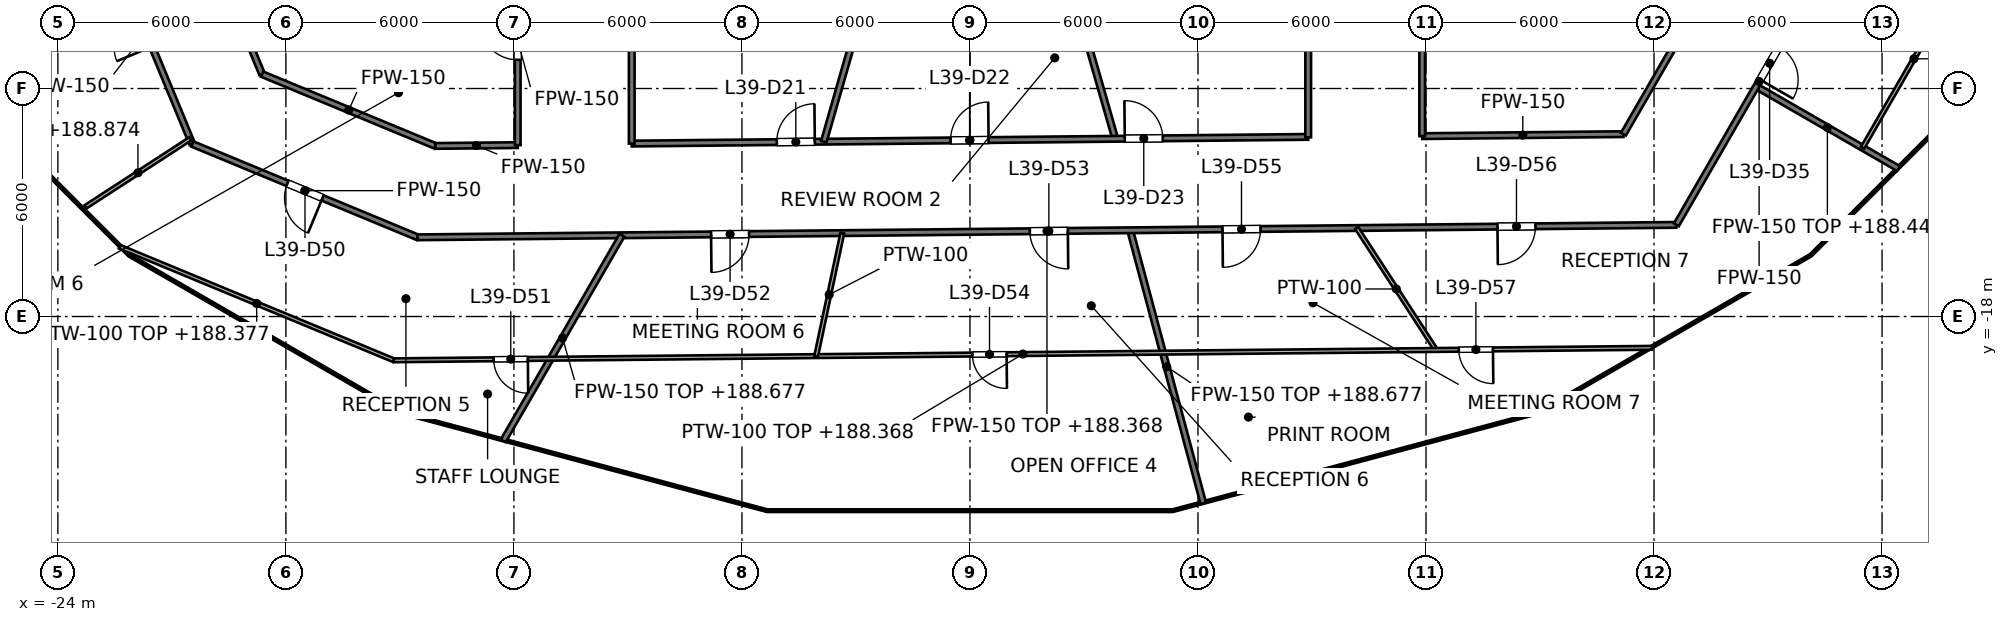
"""IFC4 building model, lengths in metres.
Left out: names, types, materials, properties, quantities, classifications, styles, units other than length and angle.
Written with IfcOpenShell. Run it as: python <this file> out.ifc"""

import sys

from ifc_helpers import new_model, si_unit, direction, frame, frame_2d, origin, place, context, subcontext, project, spatial, rectangle, extrude, element, fill, save


model = new_model("IFC4")
c1 = context("Model", 3, precision=1e-05, world=origin(), true_north=direction((0.0, 1.0)))
c2 = subcontext(c1, "Body", "Model", "MODEL_VIEW")
j1 = project(units=[si_unit("LENGTHUNIT", "METRE"), si_unit("PLANEANGLEUNIT", "RADIAN")], contexts=[c1])
p1 = place(None, origin())
s1 = spatial("IfcSite", under=j1, at=p1, CompositionType="ELEMENT")
p2 = place(p1, origin())
s2 = spatial("IfcBuilding", under=s1, at=p2, CompositionType="ELEMENT")
p3 = place(p2, frame((0.0, 0.0, 185.6)))
s3 = spatial("IfcBuildingStorey", under=s2, at=p3, CompositionType="ELEMENT", Elevation=185.6)
p4 = place(p3, frame((4.215, -15.73, 0.0), z_axis=(0.0, 0.0, 1.0), x_axis=(0.258765615768, -0.965940141052, 0.0)))
e1 = element("IfcWall", 1, at=p4, inside=s3, PredefinedType="PARTITIONING", context=c2, shape_type="SweptSolid", body=[
    extrude(rectangle(XDim=7.438, YDim=0.15, at=frame_2d((3.719, 0.0))), origin(), (0.0, 0.0, 1.0), 3.077),
])
p5 = place(p3, frame((2.296, -8.0, 0.0), z_axis=(0.0, 0.0, 1.0), x_axis=(0.275935525478, -0.961176147113, 0.0)))
e2 = element("IfcWall", 2, at=p5, inside=s3, PredefinedType="PARTITIONING", context=c2, shape_type="SweptSolid", body=[
    extrude(rectangle(XDim=5.548, YDim=0.15, at=frame_2d((2.774, 0.0))), origin(), (0.0, 0.0, 1.0), 3.7),
])
p6 = place(p3, frame((-22.9, -7.572, 0.0), z_axis=(0.0, 0.0, 1.0), x_axis=(0.382367581622, -0.924010298928, 0.0)))
e3 = element("IfcWall", 3, at=p6, inside=s3, PredefinedType="PARTITIONING", context=c2, shape_type="SweptSolid", body=[
    extrude(rectangle(XDim=6.374, YDim=0.15, at=frame_2d((3.187, 0.0))), origin(), (0.0, 0.0, 1.0), 2.777),
])
p7 = place(p6, frame((2.6, 0.0, 0.0)))
e4 = element("IfcOpeningElement", 4, at=p7, cuts=e3, PredefinedType="OPENING", context=c2, shape_type="SweptSolid", body=[
    extrude(rectangle(XDim=1.0, YDim=2.1, at=frame_2d((0.5, 1.05))), frame((0.0, 0.075, 0.0), z_axis=(0.0, -1.0, 0.0), x_axis=(1.0, 0.0, 0.0)), (0.0, 0.0, 1.0), 0.15),
])
p8 = place(p3, frame((-20.5, -7.095, 0.0), z_axis=(0.0, 0.0, 1.0), x_axis=(0.382364990163, -0.924011371303, 0.0)))
e5 = element("IfcWall", 5, at=p8, inside=s3, PredefinedType="PARTITIONING", context=c2, shape_type="SweptSolid", body=[
    extrude(rectangle(XDim=4.902, YDim=0.15, at=frame_2d((2.451, 0.0))), origin(), (0.0, 0.0, 1.0), 2.845),
])
p9 = place(p3, frame((20.69, -11.945, 0.0), z_axis=(0.0, 0.0, 1.0), x_axis=(0.866048255864, -0.499960416948, 0.0)))
e6 = element("IfcWall", 6, at=p9, inside=s3, PredefinedType="PARTITIONING", context=c2, shape_type="SweptSolid", body=[
    extrude(rectangle(XDim=4.322, YDim=0.15, at=frame_2d((2.161, 0.0))), origin(), (0.0, 0.0, 1.0), 2.845),
])
p10 = place(p3, frame((-20.46, -13.46, 0.0), z_axis=(0.0, 0.0, 1.0), x_axis=(0.923801547606, -0.382871650349, 0.0)))
e7 = element("IfcWall", 7, at=p10, inside=s3, PredefinedType="PARTITIONING", context=c2, shape_type="SweptSolid", body=[
    extrude(rectangle(XDim=6.415, YDim=0.15, at=frame_2d((3.208, 0.0))), origin(), (0.0, 0.0, 1.0), 2.777),
])
p11 = place(p10, frame((2.707, 0.0, 0.0)))
e8 = element("IfcOpeningElement", 8, at=p11, cuts=e7, PredefinedType="OPENING", context=c2, shape_type="SweptSolid", body=[
    extrude(rectangle(XDim=1.0, YDim=2.1, at=frame_2d((0.5, 1.05))), frame((0.0, 0.075, 0.0), z_axis=(0.0, -1.0, 0.0), x_axis=(1.0, 0.0, 0.0)), (0.0, 0.0, 1.0), 0.15),
])
p12 = place(p3, frame((-18.623, -11.623, 0.0), z_axis=(0.0, 0.0, 1.0), x_axis=(0.923791670587, -0.38289548098, 0.0)))
e9 = element("IfcWall", 9, at=p12, inside=s3, PredefinedType="PARTITIONING", context=c2, shape_type="SweptSolid", body=[
    extrude(rectangle(XDim=4.931, YDim=0.15, at=frame_2d((2.465, 0.0))), origin(), (0.0, 0.0, 1.0), 2.777),
])
p13 = place(p3, frame((-14.534, -15.916, 0.0), z_axis=(0.0, 0.0, 1.0), x_axis=(0.999951221888, 0.009876935033, 0.0)))
e10 = element("IfcWall", 10, at=p13, inside=s3, PredefinedType="PARTITIONING", context=c2, shape_type="SweptSolid", body=[
    extrude(rectangle(XDim=33.123, YDim=0.15, at=frame_2d((16.561, 0.0))), origin(), (0.0, 0.0, 1.0), 2.768),
])
p14 = place(p13, frame((7.722, 0.0, 0.0)))
e11 = element("IfcOpeningElement", 11, at=p14, cuts=e10, PredefinedType="OPENING", context=c2, shape_type="SweptSolid", body=[
    extrude(rectangle(XDim=1.0, YDim=2.1, at=frame_2d((0.5, 1.05))), frame((0.0, 0.075, 0.0), z_axis=(0.0, -1.0, 0.0), x_axis=(1.0, 0.0, 0.0)), (0.0, 0.0, 1.0), 0.15),
])
p15 = place(p13, frame((16.111, 0.0, 0.0)))
e12 = element("IfcOpeningElement", 12, at=p15, cuts=e10, PredefinedType="OPENING", context=c2, shape_type="SweptSolid", body=[
    extrude(rectangle(XDim=1.0, YDim=2.1, at=frame_2d((0.5, 1.05))), frame((0.0, 0.075, 0.0), z_axis=(0.0, -1.0, 0.0), x_axis=(1.0, 0.0, 0.0)), (0.0, 0.0, 1.0), 0.15),
])
p16 = place(p13, frame((21.18, 0.0, 0.0)))
e13 = element("IfcOpeningElement", 13, at=p16, cuts=e10, PredefinedType="OPENING", context=c2, shape_type="SweptSolid", body=[
    extrude(rectangle(XDim=1.0, YDim=2.1, at=frame_2d((0.5, 1.05))), frame((0.0, 0.075, 0.0), z_axis=(0.0, -1.0, 0.0), x_axis=(1.0, 0.0, 0.0)), (0.0, 0.0, 1.0), 0.15),
])
p17 = place(p13, frame((28.416, 0.0, 0.0)))
e14 = element("IfcOpeningElement", 14, at=p17, cuts=e10, PredefinedType="OPENING", context=c2, shape_type="SweptSolid", body=[
    extrude(rectangle(XDim=1.0, YDim=2.1, at=frame_2d((0.5, 1.05))), frame((0.0, 0.075, 0.0), z_axis=(0.0, -1.0, 0.0), x_axis=(1.0, 0.0, 0.0)), (0.0, 0.0, 1.0), 0.15),
])
p18 = place(p3, frame((-14.068, -13.511, 0.0), z_axis=(0.0, 0.0, 1.0), x_axis=(0.999950911515, 0.009908307647, 0.0)))
e15 = element("IfcWall", 15, at=p18, inside=s3, PredefinedType="PARTITIONING", context=c2, shape_type="SweptSolid", body=[
    extrude(rectangle(XDim=2.168, YDim=0.15, at=frame_2d((1.084, 0.0))), origin(), (0.0, 0.0, 1.0), 2.777),
])
p19 = place(p3, frame((-8.9, -13.449, 0.0), z_axis=(0.0, 0.0, 1.0), x_axis=(0.999951241216, 0.009874977968, 0.0)))
e16 = element("IfcWall", 16, at=p19, inside=s3, PredefinedType="PARTITIONING", context=c2, shape_type="SweptSolid", body=[
    extrude(rectangle(XDim=17.801, YDim=0.15, at=frame_2d((8.9, 0.0))), origin(), (0.0, 0.0, 1.0), 2.768),
])
p20 = place(p19, frame((3.817, 0.0, 0.0)))
e17 = element("IfcOpeningElement", 17, at=p20, cuts=e16, PredefinedType="OPENING", context=c2, shape_type="SweptSolid", body=[
    extrude(rectangle(XDim=1.0, YDim=2.1, at=frame_2d((0.5, 1.05))), frame((0.0, 0.075, 0.0), z_axis=(0.0, -1.0, 0.0), x_axis=(1.0, 0.0, 0.0)), (0.0, 0.0, 1.0), 0.15),
])
p21 = place(p19, frame((8.39, 0.0, 0.0)))
e18 = element("IfcOpeningElement", 18, at=p21, cuts=e16, PredefinedType="OPENING", context=c2, shape_type="SweptSolid", body=[
    extrude(rectangle(XDim=1.0, YDim=2.1, at=frame_2d((0.5, 1.05))), frame((0.0, 0.075, 0.0), z_axis=(0.0, -1.0, 0.0), x_axis=(1.0, 0.0, 0.0)), (0.0, 0.0, 1.0), 0.15),
])
p22 = place(p19, frame((12.974, 0.0, 0.0)))
e19 = element("IfcOpeningElement", 19, at=p22, cuts=e16, PredefinedType="OPENING", context=c2, shape_type="SweptSolid", body=[
    extrude(rectangle(XDim=1.0, YDim=2.1, at=frame_2d((0.5, 1.05))), frame((0.0, 0.075, 0.0), z_axis=(0.0, -1.0, 0.0), x_axis=(1.0, 0.0, 0.0)), (0.0, 0.0, 1.0), 0.15),
])
p23 = place(p3, frame((11.9, -13.253, 0.0), z_axis=(0.0, 0.0, 1.0), x_axis=(0.999951309192, 0.009868092237, 0.0)))
e20 = element("IfcWall", 20, at=p23, inside=s3, PredefinedType="PARTITIONING", context=c2, shape_type="SweptSolid", body=[
    extrude(rectangle(XDim=5.294, YDim=0.15, at=frame_2d((2.647, 0.0))), origin(), (0.0, 0.0, 1.0), 2.777),
])
p24 = place(p3, frame((18.587, -15.587, 0.0), z_axis=(0.0, 0.0, 1.0), x_axis=(0.499960140076, 0.866048415699, 0.0)))
e21 = element("IfcWall", 21, at=p24, inside=s3, PredefinedType="PARTITIONING", context=c2, shape_type="SweptSolid", body=[
    extrude(rectangle(XDim=8.714, YDim=0.15, at=frame_2d((4.357, 0.0))), origin(), (0.0, 0.0, 1.0), 2.777),
])
p25 = place(p24, frame((4.41, 0.0, 0.0)))
e22 = element("IfcOpeningElement", 22, at=p25, cuts=e21, PredefinedType="OPENING", context=c2, shape_type="SweptSolid", body=[
    extrude(rectangle(XDim=1.0, YDim=2.1, at=frame_2d((0.5, 1.05))), frame((0.0, 0.075, 0.0), z_axis=(0.0, -1.0, 0.0), x_axis=(1.0, 0.0, 0.0)), (0.0, 0.0, 1.0), 0.15),
])
p26 = place(p3, frame((17.194, -13.201, 0.0), z_axis=(0.0, 0.0, 1.0), x_axis=(0.499955744085, 0.866050953441, 0.0)))
e23 = element("IfcWall", 23, at=p26, inside=s3, PredefinedType="PARTITIONING", context=c2, shape_type="SweptSolid", body=[
    extrude(rectangle(XDim=6.673, YDim=0.15, at=frame_2d((3.337, 0.0))), origin(), (0.0, 0.0, 1.0), 2.777),
])
p27 = place(p26, frame((2.835, 0.0, 0.0)))
e24 = element("IfcOpeningElement", 24, at=p27, cuts=e23, PredefinedType="OPENING", context=c2, shape_type="SweptSolid", body=[
    extrude(rectangle(XDim=1.0, YDim=2.1, at=frame_2d((0.5, 1.05))), frame((0.0, 0.075, 0.0), z_axis=(0.0, -1.0, 0.0), x_axis=(1.0, 0.0, 0.0)), (0.0, 0.0, 1.0), 0.15),
])
p28 = place(p3, frame((-12.28, -21.27, 0.0), z_axis=(0.0, 0.0, 1.0), x_axis=(0.499966163276, 0.866044938545, 0.0)))
e25 = element("IfcWall", 25, at=p28, inside=s3, PredefinedType="PARTITIONING", context=c2, shape_type="SweptSolid", body=[
    extrude(rectangle(XDim=6.244, YDim=0.15, at=frame_2d((3.122, 0.0))), origin(), (0.0, 0.0, 1.0), 3.077),
])
p29 = place(p3, frame((-3.846, -13.399, 0.0), z_axis=(0.0, 0.0, 1.0), x_axis=(0.275914969745, 0.961182048038, 0.0)))
e26 = element("IfcWall", 26, at=p29, inside=s3, PredefinedType="PARTITIONING", context=c2, shape_type="SweptSolid", body=[
    extrude(rectangle(XDim=5.617, YDim=0.15, at=frame_2d((2.809, 0.0))), origin(), (0.0, 0.0, 1.0), 3.7),
])
p30 = place(p3, frame((11.9, -13.253, 0.0), z_axis=(0.0, 0.0, 1.0), x_axis=(0.0, 1.0, 0.0)))
e27 = element("IfcWall", 27, at=p30, inside=s3, PredefinedType="PARTITIONING", context=c2, shape_type="SweptSolid", body=[
    extrude(rectangle(XDim=5.253, YDim=0.15, at=frame_2d((2.626, 0.0))), origin(), (0.0, 0.0, 1.0), 2.777),
])
p31 = place(p3, frame((8.9, -13.283, 0.0), z_axis=(0.0, 0.0, 1.0), x_axis=(0.0, 1.0, 0.0)))
e28 = element("IfcWall", 28, at=p31, inside=s3, PredefinedType="PARTITIONING", context=c2, shape_type="SweptSolid", body=[
    extrude(rectangle(XDim=5.283, YDim=0.15, at=frame_2d((2.642, 0.0))), origin(), (0.0, 0.0, 1.0), 2.777),
])
p32 = place(p3, frame((-8.9, -13.449, 0.0), z_axis=(0.0, 0.0, 1.0), x_axis=(0.0, 1.0, 0.0)))
e29 = element("IfcWall", 29, at=p32, inside=s3, PredefinedType="PARTITIONING", context=c2, shape_type="SweptSolid", body=[
    extrude(rectangle(XDim=5.449, YDim=0.15, at=frame_2d((2.725, 0.0))), origin(), (0.0, 0.0, 1.0), 2.777),
])
p33 = place(p3, frame((-11.9, -13.49, 0.0), z_axis=(0.0, 0.0, 1.0), x_axis=(0.0, 1.0, 0.0)))
e30 = element("IfcWall", 30, at=p33, inside=s3, PredefinedType="PARTITIONING", context=c2, shape_type="SweptSolid", body=[
    extrude(rectangle(XDim=5.49, YDim=0.15, at=frame_2d((2.745, 0.0))), origin(), (0.0, 0.0, 1.0), 2.777),
])
p34 = place(p33, frame((2.245, 0.0, 0.0)))
e31 = element("IfcOpeningElement", 31, at=p34, cuts=e30, PredefinedType="OPENING", context=c2, shape_type="SweptSolid", body=[
    extrude(rectangle(XDim=1.0, YDim=2.1, at=frame_2d((0.5, 1.05))), frame((0.0, 0.075, 0.0), z_axis=(0.0, -1.0, 0.0), x_axis=(1.0, 0.0, 0.0)), (0.0, 0.0, 1.0), 0.15),
])
p35 = place(p3, frame((10.177, -15.671, 0.0), z_axis=(0.0, 0.0, 1.0), x_axis=(0.544647409198, -0.838665129628, 0.0)))
e32 = element("IfcWall", 32, at=p35, inside=s3, PredefinedType="PARTITIONING", context=c2, shape_type="SweptSolid", body=[
    extrude(rectangle(XDim=3.826, YDim=0.1, at=frame_2d((1.913, 0.0))), origin(), (0.0, 0.0, 1.0), 3.7),
])
p36 = place(p3, frame((-22.377, -16.162, 0.0), z_axis=(0.0, 0.0, 1.0), x_axis=(0.92383433172, -0.382792538505, 0.0)))
e33 = element("IfcWall", 33, at=p36, inside=s3, PredefinedType="PARTITIONING", context=c2, shape_type="SweptSolid", body=[
    extrude(rectangle(XDim=7.811, YDim=0.1, at=frame_2d((3.906, 0.0))), origin(), (0.0, 0.0, 1.0), 2.777),
])
p37 = place(p3, frame((-15.161, -19.152, 0.0), z_axis=(0.0, 0.0, 1.0), x_axis=(0.999950812999, 0.009918244889, 0.0)))
e34 = element("IfcWall", 34, at=p37, inside=s3, PredefinedType="PARTITIONING", context=c2, shape_type="SweptSolid", body=[
    extrude(rectangle(XDim=33.108, YDim=0.1, at=frame_2d((16.554, 0.0))), origin(), (0.0, 0.0, 1.0), 2.768),
])
p38 = place(p37, frame((2.628, 0.0, 0.0)))
e35 = element("IfcOpeningElement", 35, at=p38, cuts=e34, PredefinedType="OPENING", context=c2, shape_type="SweptSolid", body=[
    extrude(rectangle(XDim=0.9, YDim=2.1, at=frame_2d((0.45, 1.05))), frame((0.0, 0.05, 0.0), z_axis=(0.0, -1.0, 0.0), x_axis=(1.0, 0.0, 0.0)), (0.0, 0.0, 1.0), 0.1),
])
p39 = place(p37, frame((15.226, 0.0, 0.0)))
e36 = element("IfcOpeningElement", 36, at=p39, cuts=e34, PredefinedType="OPENING", context=c2, shape_type="SweptSolid", body=[
    extrude(rectangle(XDim=0.9, YDim=2.1, at=frame_2d((0.45, 1.05))), frame((0.0, 0.05, 0.0), z_axis=(0.0, -1.0, 0.0), x_axis=(1.0, 0.0, 0.0)), (0.0, 0.0, 1.0), 0.1),
])
p40 = place(p37, frame((28.024, 0.0, 0.0)))
e37 = element("IfcOpeningElement", 37, at=p40, cuts=e34, PredefinedType="OPENING", context=c2, shape_type="SweptSolid", body=[
    extrude(rectangle(XDim=0.9, YDim=2.1, at=frame_2d((0.45, 1.05))), frame((0.0, 0.05, 0.0), z_axis=(0.0, -1.0, 0.0), x_axis=(1.0, 0.0, 0.0)), (0.0, 0.0, 1.0), 0.1),
])
p41 = place(p3, frame((-23.271, -15.113, 0.0), z_axis=(0.0, 0.0, 1.0), x_axis=(0.83866769183, 0.544643463819, 0.0)))
e38 = element("IfcWall", 38, at=p41, inside=s3, PredefinedType="PARTITIONING", context=c2, shape_type="SweptSolid", body=[
    extrude(rectangle(XDim=3.285, YDim=0.1, at=frame_2d((1.643, 0.0))), origin(), (0.0, 0.0, 1.0), 3.273),
])
p42 = place(p3, frame((23.487, -13.56, 0.0), z_axis=(0.0, 0.0, 1.0), x_axis=(0.500066272392, 0.86598713802, 0.0)))
e39 = element("IfcWall", 39, at=p42, inside=s3, PredefinedType="PARTITIONING", context=c2, shape_type="SweptSolid", body=[
    extrude(rectangle(XDim=5.409, YDim=0.1, at=frame_2d((2.705, 0.0))), origin(), (0.0, 0.0, 1.0), 2.845),
])
p43 = place(p3, frame((-4.047, -19.042, 0.0), z_axis=(0.0, 0.0, 1.0), x_axis=(0.207961984092, 0.978136909217, 0.0)))
e40 = element("IfcWall", 40, at=p43, inside=s3, PredefinedType="PARTITIONING", context=c2, shape_type="SweptSolid", body=[
    extrude(rectangle(XDim=3.309, YDim=0.1, at=frame_2d((1.655, 0.0))), origin(), (0.0, 0.0, 1.0), 3.7),
])
p44 = place(p20, origin())
e41 = element("IfcDoor", 41, at=p44, inside=s3, OperationType="SINGLE_SWING_RIGHT", PredefinedType="DOOR", context=c2, shape_type="SweptSolid", body=[
    extrude(rectangle(XDim=1.0, YDim=2.1, at=frame_2d((0.5, 1.05))), frame((0.0, 0.025, 0.0), z_axis=(0.0, -1.0, 0.0), x_axis=(1.0, 0.0, 0.0)), (0.0, 0.0, 1.0), 0.05),
])
fill(e17, e41)
p45 = place(p21, origin())
e42 = element("IfcDoor", 42, at=p45, inside=s3, OperationType="SINGLE_SWING_RIGHT", PredefinedType="DOOR", context=c2, shape_type="SweptSolid", body=[
    extrude(rectangle(XDim=1.0, YDim=2.1, at=frame_2d((0.5, 1.05))), frame((0.0, 0.025, 0.0), z_axis=(0.0, -1.0, 0.0), x_axis=(1.0, 0.0, 0.0)), (0.0, 0.0, 1.0), 0.05),
])
fill(e18, e42)
p46 = place(p22, origin())
e43 = element("IfcDoor", 43, at=p46, inside=s3, OperationType="SINGLE_SWING_LEFT", PredefinedType="DOOR", context=c2, shape_type="SweptSolid", body=[
    extrude(rectangle(XDim=1.0, YDim=2.1, at=frame_2d((0.5, 1.05))), frame((0.0, 0.025, 0.0), z_axis=(0.0, -1.0, 0.0), x_axis=(1.0, 0.0, 0.0)), (0.0, 0.0, 1.0), 0.05),
])
fill(e19, e43)
p47 = place(p34, origin())
e44 = element("IfcDoor", 44, at=p47, inside=s3, OperationType="SINGLE_SWING_RIGHT", PredefinedType="DOOR", context=c2, shape_type="SweptSolid", body=[
    extrude(rectangle(XDim=1.0, YDim=2.1, at=frame_2d((0.5, 1.05))), frame((0.0, 0.025, 0.0), z_axis=(0.0, -1.0, 0.0), x_axis=(1.0, 0.0, 0.0)), (0.0, 0.0, 1.0), 0.05),
])
fill(e31, e44)
p48 = place(p25, origin())
e45 = element("IfcDoor", 45, at=p48, inside=s3, OperationType="SINGLE_SWING_LEFT", PredefinedType="DOOR", context=c2, shape_type="SweptSolid", body=[
    extrude(rectangle(XDim=1.0, YDim=2.1, at=frame_2d((0.5, 1.05))), frame((0.0, 0.025, 0.0), z_axis=(0.0, -1.0, 0.0), x_axis=(1.0, 0.0, 0.0)), (0.0, 0.0, 1.0), 0.05),
])
fill(e22, e45)
p49 = place(p11, origin())
e46 = element("IfcDoor", 46, at=p49, inside=s3, OperationType="SINGLE_SWING_RIGHT", PredefinedType="DOOR", context=c2, shape_type="SweptSolid", body=[
    extrude(rectangle(XDim=1.0, YDim=2.1, at=frame_2d((0.5, 1.05))), frame((0.0, 0.025, 0.0), z_axis=(0.0, -1.0, 0.0), x_axis=(1.0, 0.0, 0.0)), (0.0, 0.0, 1.0), 0.05),
])
fill(e8, e46)
p50 = place(p38, origin())
e47 = element("IfcDoor", 47, at=p50, inside=s3, OperationType="SINGLE_SWING_RIGHT", PredefinedType="DOOR", context=c2, shape_type="SweptSolid", body=[
    extrude(rectangle(XDim=0.9, YDim=2.1, at=frame_2d((0.45, 1.05))), frame((0.0, 0.025, 0.0), z_axis=(0.0, -1.0, 0.0), x_axis=(1.0, 0.0, 0.0)), (0.0, 0.0, 1.0), 0.05),
])
fill(e35, e47)
p51 = place(p14, origin())
e48 = element("IfcDoor", 48, at=p51, inside=s3, OperationType="SINGLE_SWING_LEFT", PredefinedType="DOOR", context=c2, shape_type="SweptSolid", body=[
    extrude(rectangle(XDim=1.0, YDim=2.1, at=frame_2d((0.5, 1.05))), frame((0.0, 0.025, 0.0), z_axis=(0.0, -1.0, 0.0), x_axis=(1.0, 0.0, 0.0)), (0.0, 0.0, 1.0), 0.05),
])
fill(e11, e48)
p52 = place(p15, origin())
e49 = element("IfcDoor", 49, at=p52, inside=s3, OperationType="SINGLE_SWING_RIGHT", PredefinedType="DOOR", context=c2, shape_type="SweptSolid", body=[
    extrude(rectangle(XDim=1.0, YDim=2.1, at=frame_2d((0.5, 1.05))), frame((0.0, 0.025, 0.0), z_axis=(0.0, -1.0, 0.0), x_axis=(1.0, 0.0, 0.0)), (0.0, 0.0, 1.0), 0.05),
])
fill(e12, e49)
p53 = place(p39, origin())
e50 = element("IfcDoor", 50, at=p53, inside=s3, OperationType="SINGLE_SWING_RIGHT", PredefinedType="DOOR", context=c2, shape_type="SweptSolid", body=[
    extrude(rectangle(XDim=0.9, YDim=2.1, at=frame_2d((0.45, 1.05))), frame((0.0, 0.025, 0.0), z_axis=(0.0, -1.0, 0.0), x_axis=(1.0, 0.0, 0.0)), (0.0, 0.0, 1.0), 0.05),
])
fill(e36, e50)
p54 = place(p16, origin())
e51 = element("IfcDoor", 51, at=p54, inside=s3, OperationType="SINGLE_SWING_LEFT", PredefinedType="DOOR", context=c2, shape_type="SweptSolid", body=[
    extrude(rectangle(XDim=1.0, YDim=2.1, at=frame_2d((0.5, 1.05))), frame((0.0, 0.025, 0.0), z_axis=(0.0, -1.0, 0.0), x_axis=(1.0, 0.0, 0.0)), (0.0, 0.0, 1.0), 0.05),
])
fill(e13, e51)
p55 = place(p17, origin())
e52 = element("IfcDoor", 52, at=p55, inside=s3, OperationType="SINGLE_SWING_LEFT", PredefinedType="DOOR", context=c2, shape_type="SweptSolid", body=[
    extrude(rectangle(XDim=1.0, YDim=2.1, at=frame_2d((0.5, 1.05))), frame((0.0, 0.025, 0.0), z_axis=(0.0, -1.0, 0.0), x_axis=(1.0, 0.0, 0.0)), (0.0, 0.0, 1.0), 0.05),
])
fill(e14, e52)
p56 = place(p40, origin())
e53 = element("IfcDoor", 53, at=p56, inside=s3, OperationType="SINGLE_SWING_RIGHT", PredefinedType="DOOR", context=c2, shape_type="SweptSolid", body=[
    extrude(rectangle(XDim=0.9, YDim=2.1, at=frame_2d((0.45, 1.05))), frame((0.0, 0.025, 0.0), z_axis=(0.0, -1.0, 0.0), x_axis=(1.0, 0.0, 0.0)), (0.0, 0.0, 1.0), 0.05),
])
fill(e37, e53)
save(model, sys.argv[1])
